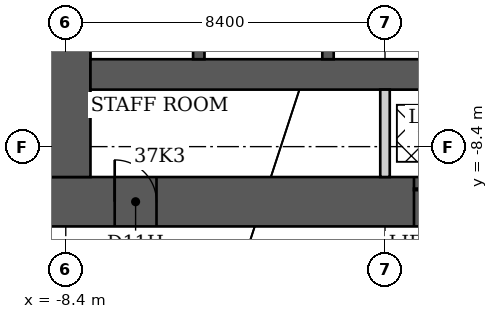
"""IFC4 building model, lengths in metres.
Left out: names, types, materials, properties, quantities, classifications, styles, units other than length and angle.
Written with IfcOpenShell. Run it as: python <this file> out.ifc"""

import sys

from ifc_helpers import new_model, si_unit, direction, frame, frame_2d, origin, place, context, subcontext, project, spatial, rectangle, extrude, element, fill, save


model = new_model("IFC4")
c1 = context("Model", 3, precision=1e-05, world=origin(), true_north=direction((0.0, 1.0)))
c2 = subcontext(c1, "Body", "Model", "MODEL_VIEW")
j1 = project(units=[si_unit("LENGTHUNIT", "METRE"), si_unit("PLANEANGLEUNIT", "RADIAN")], contexts=[c1])
p1 = place(None, origin())
s1 = spatial("IfcSite", under=j1, at=p1, CompositionType="ELEMENT")
p2 = place(p1, origin())
s2 = spatial("IfcBuilding", under=s1, at=p2, CompositionType="ELEMENT")
p3 = place(p2, frame((0.0, 0.0, 150.0)))
s3 = spatial("IfcBuildingStorey", under=s2, at=p3, CompositionType="ELEMENT", Elevation=150.0)
p4 = place(p3, frame((-9.05, -9.85, 0.0), z_axis=(0.0, 0.0, 1.0), x_axis=(1.0, 0.0, 0.0)))
e1 = element("IfcWall", 1, at=p4, inside=s3, PredefinedType="SHEAR", context=c2, shape_type="SweptSolid", body=[
    extrude(rectangle(XDim=18.1, YDim=1.3, at=frame_2d((9.05, 0.0))), origin(), (0.0, 0.0, 1.0), 3.8),
])
p5 = place(p4, frame((1.938, 0.0, 0.0)))
e2 = element("IfcOpeningElement", 2, at=p5, cuts=e1, PredefinedType="OPENING", context=c2, shape_type="SweptSolid", body=[
    extrude(rectangle(XDim=1.1, YDim=2.2, at=frame_2d((0.55, 1.1))), frame((0.0, 0.65, 0.0), z_axis=(0.0, -1.0, 0.0), x_axis=(1.0, 0.0, 0.0)), (0.0, 0.0, 1.0), 1.3),
])
p6 = place(p4, frame((9.812, 0.0, 0.0)))
e3 = element("IfcOpeningElement", 3, at=p6, cuts=e1, PredefinedType="OPENING", context=c2, shape_type="SweptSolid", body=[
    extrude(rectangle(XDim=1.1, YDim=2.1, at=frame_2d((0.55, 1.05))), frame((0.0, 0.65, 0.0), z_axis=(0.0, -1.0, 0.0), x_axis=(1.0, 0.0, 0.0)), (0.0, 0.0, 1.0), 1.3),
])
p7 = place(p4, frame((12.438, 0.0, 0.0)))
e4 = element("IfcOpeningElement", 4, at=p7, cuts=e1, PredefinedType="OPENING", context=c2, shape_type="SweptSolid", body=[
    extrude(rectangle(XDim=1.1, YDim=2.1, at=frame_2d((0.55, 1.05))), frame((0.0, 0.65, 0.0), z_axis=(0.0, -1.0, 0.0), x_axis=(1.0, 0.0, 0.0)), (0.0, 0.0, 1.0), 1.3),
])
p8 = place(p4, frame((15.062, 0.0, 0.0)))
e5 = element("IfcOpeningElement", 5, at=p8, cuts=e1, PredefinedType="OPENING", context=c2, shape_type="SweptSolid", body=[
    extrude(rectangle(XDim=1.1, YDim=2.1, at=frame_2d((0.55, 1.05))), frame((0.0, 0.65, 0.0), z_axis=(0.0, -1.0, 0.0), x_axis=(1.0, 0.0, 0.0)), (0.0, 0.0, 1.0), 1.3),
])
p9 = place(p3, frame((-8.4, -9.2, 0.0), z_axis=(0.0, 0.0, 1.0), x_axis=(0.0, 1.0, 0.0)))
e6 = element("IfcWall", 6, at=p9, inside=s3, PredefinedType="SHEAR", context=c2, shape_type="SweptSolid", body=[
    extrude(rectangle(XDim=15.3, YDim=1.3, at=frame_2d((7.65, 0.0))), origin(), (0.0, 0.0, 1.0), 3.8),
])
p10 = place(p9, frame((10.7, 0.0, 0.0)))
e7 = element("IfcOpeningElement", 7, at=p10, cuts=e6, PredefinedType="OPENING", context=c2, shape_type="SweptSolid", body=[
    extrude(rectangle(XDim=1.2, YDim=2.2, at=frame_2d((0.6, 1.1))), frame((0.0, 0.65, 0.0), z_axis=(0.0, -1.0, 0.0), x_axis=(1.0, 0.0, 0.0)), (0.0, 0.0, 1.0), 1.3),
])
p11 = place(p3, frame((-7.75, -6.5, 0.0), z_axis=(0.0, 0.0, 1.0), x_axis=(1.0, 0.0, 0.0)))
e8 = element("IfcWall", 8, at=p11, inside=s3, PredefinedType="SHEAR", context=c2, shape_type="SweptSolid", body=[
    extrude(rectangle(XDim=15.5, YDim=0.8, at=frame_2d((7.75, 0.0))), origin(), (0.0, 0.0, 1.0), 3.8),
])
for number, where, z_axis, x_axis in (
    (9, (-4.9, -6.1, 0.0), (0.0, 0.0, 1.0), (0.0, 1.0, 0.0)),
    (10, (-1.5, -6.1, 0.0), (0.0, 0.0, 1.0), (0.0, 1.0, 0.0)),
):
    element("IfcWall", number, at=place(p3, frame(where, z_axis=z_axis, x_axis=x_axis)), inside=s3, PredefinedType="SHEAR", context=c2, shape_type="SweptSolid", body=[
        extrude(rectangle(XDim=7.2, YDim=0.3, at=frame_2d((3.6, 0.0))), origin(), (0.0, 0.0, 1.0), 3.8),
    ])
p12 = place(p3, frame((0.0, -9.2, 0.0), z_axis=(0.0, 0.0, 1.0), x_axis=(0.0, 1.0, 0.0)))
e11 = element("IfcWall", 11, at=p12, inside=s3, PredefinedType="PARTITIONING", context=c2, shape_type="SweptSolid", body=[
    extrude(rectangle(XDim=2.3, YDim=0.25, at=frame_2d((1.15, 0.0))), origin(), (0.0, 0.0, 1.0), 3.8),
])
p13 = place(p3, frame((-11.63, -8.65, 0.0), z_axis=(0.0, 0.0, 1.0), x_axis=(0.500367528775, -0.865813106939, 0.0)))
e12 = element("IfcWall", 12, at=p13, inside=s3, PredefinedType="PARTITIONING", context=c2, shape_type="SweptSolid", body=[
    extrude(rectangle(XDim=8.593, YDim=0.2, at=frame_2d((4.297, 0.0))), origin(), (0.0, 0.0, 1.0), 3.64),
])
p14 = place(p13, frame((3.797, 0.0, 0.0)))
e13 = element("IfcOpeningElement", 13, at=p14, cuts=e12, PredefinedType="OPENING", context=c2, shape_type="SweptSolid", body=[
    extrude(rectangle(XDim=1.0, YDim=2.13, at=frame_2d((0.5, 1.065))), frame((0.0, 0.1, 0.0), z_axis=(0.0, -1.0, 0.0), x_axis=(1.0, 0.0, 0.0)), (0.0, 0.0, 1.0), 0.2),
])
p15 = place(p5, origin())
e14 = element("IfcDoor", 14, at=p15, inside=s3, OperationType="SINGLE_SWING_LEFT", PredefinedType="DOOR", context=c2, shape_type="SweptSolid", body=[
    extrude(rectangle(XDim=1.1, YDim=2.2, at=frame_2d((0.55, 1.1))), frame((0.0, 0.025, 0.0), z_axis=(0.0, -1.0, 0.0), x_axis=(1.0, 0.0, 0.0)), (0.0, 0.0, 1.0), 0.05),
])
fill(e2, e14)
p16 = place(p6, origin())
e15 = element("IfcDoor", 15, at=p16, inside=s3, OperationType="DOUBLE_DOOR_SLIDING", PredefinedType="DOOR", context=c2, shape_type="SweptSolid", body=[
    extrude(rectangle(XDim=1.1, YDim=2.1, at=frame_2d((0.55, 1.05))), frame((0.0, 0.025, 0.0), z_axis=(0.0, -1.0, 0.0), x_axis=(1.0, 0.0, 0.0)), (0.0, 0.0, 1.0), 0.05),
])
fill(e3, e15)
save(model, sys.argv[1])
